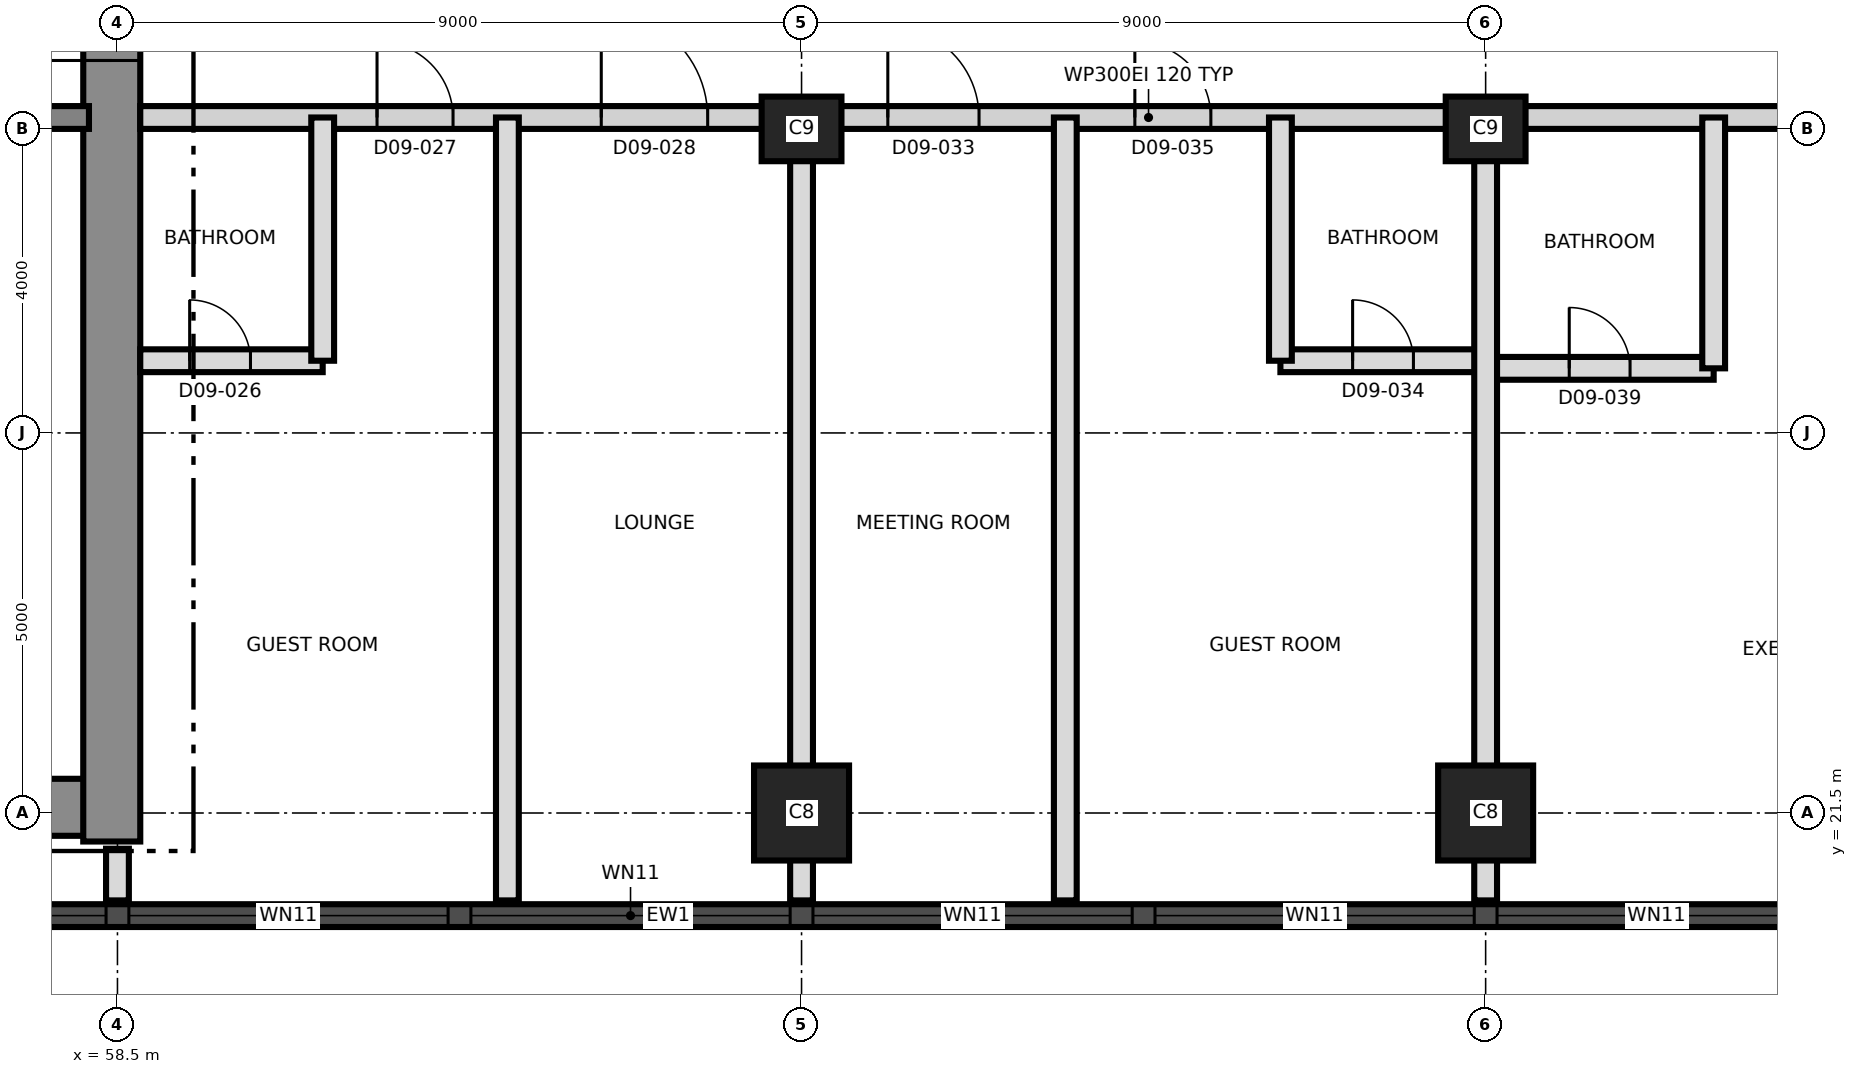
"""IFC4 building model, lengths in metres.
Left out: names, types, materials, properties, quantities, classifications, styles, units other than length and angle.
Written with IfcOpenShell. Run it as: python <this file> out.ifc"""

import sys

from ifc_helpers import new_model, si_unit, direction, frame, frame_2d, origin, origin_2d, place, context, subcontext, project, spatial, rectangle, extrude, element, fill, save


model = new_model("IFC4")
c1 = context("Model", 3, precision=1e-05, world=origin(), true_north=direction((0.0, 1.0)))
c2 = subcontext(c1, "Body", "Model", "MODEL_VIEW")
j1 = project(units=[si_unit("LENGTHUNIT", "METRE"), si_unit("PLANEANGLEUNIT", "RADIAN")], contexts=[c1])
p1 = place(None, origin())
s1 = spatial("IfcSite", under=j1, at=p1, CompositionType="ELEMENT")
p2 = place(p1, origin())
s2 = spatial("IfcBuilding", under=s1, at=p2, CompositionType="ELEMENT")
p3 = place(p2, frame((0.0, 0.0, 109.3)))
s3 = spatial("IfcBuildingStorey", under=s2, at=p3, CompositionType="ELEMENT", Elevation=109.3)
p4 = place(p3, frame((31.125, 21.575, 0.0), z_axis=(0.0, 0.0, 1.0), x_axis=(1.0, 0.0, 0.0)))
e1 = element("IfcWall", 1, at=p4, inside=s3, PredefinedType="SHEAR", context=c2, shape_type="SweptSolid", body=[
    extrude(rectangle(XDim=27.0, YDim=0.75, at=frame_2d((13.5, 0.0))), origin(), (0.0, 0.0, 1.0), 3.7),
])
p5 = place(p3, frame((58.425, 21.125, 0.0), z_axis=(0.0, 0.0, 1.0), x_axis=(0.0, 1.0, 0.0)))
e2 = element("IfcWall", 2, at=p5, inside=s3, PredefinedType="SHEAR", context=c2, shape_type="SweptSolid", body=[
    extrude(rectangle(XDim=18.75, YDim=0.75, at=frame_2d((9.375, 0.0))), origin(), (0.0, 0.0, 1.0), 3.7),
])
p6 = place(p5, frame((10.275, 0.0, 0.0)))
e3 = element("IfcOpeningElement", 3, at=p6, cuts=e2, PredefinedType="OPENING", context=c2, shape_type="SweptSolid", body=[
    extrude(rectangle(XDim=1.2, YDim=2.1, at=frame_2d((0.6, 1.05))), frame((0.0, 0.385, 0.0), z_axis=(0.0, -1.0, 0.0), x_axis=(1.0, 0.0, 0.0)), (0.0, 0.0, 1.0), 0.77),
])
p7 = place(p3, frame((31.875, 30.65, 0.0), z_axis=(0.0, 0.0, 1.0), x_axis=(1.0, 0.0, 0.0)))
e4 = element("IfcWall", 4, at=p7, inside=s3, PredefinedType="SHEAR", context=c2, shape_type="SweptSolid", body=[
    extrude(rectangle(XDim=26.25, YDim=0.3, at=frame_2d((13.125, 0.0))), origin(), (0.0, 0.0, 1.0), 3.7),
])
p8 = place(p7, frame((24.625, 0.0, 0.0)))
e5 = element("IfcOpeningElement", 5, at=p8, cuts=e4, PredefinedType="OPENING", context=c2, shape_type="SweptSolid", body=[
    extrude(rectangle(XDim=1.0, YDim=2.1, at=frame_2d((0.5, 1.05))), frame((0.0, 0.16, 0.0), z_axis=(0.0, -1.0, 0.0), x_axis=(1.0, 0.0, 0.0)), (0.0, 0.0, 1.0), 0.32),
])
p9 = place(p7, frame((11.425, 0.0, 0.0)))
e6 = element("IfcOpeningElement", 6, at=p9, cuts=e4, PredefinedType="OPENING", context=c2, shape_type="SweptSolid", body=[
    extrude(rectangle(XDim=1.0, YDim=2.1, at=frame_2d((0.5, 1.05))), frame((0.0, 0.16, 0.0), z_axis=(0.0, -1.0, 0.0), x_axis=(1.0, 0.0, 0.0)), (0.0, 0.0, 1.0), 0.32),
])
for number, where, z_axis, x_axis in (
    (7, (67.5, 21.5, 0.0), (0.0, 0.0, 1.0), (1.0, 0.0, 0.0)),
    (8, (76.5, 21.5, 0.0), (0.0, 0.0, 1.0), (1.0, 0.0, 0.0)),
):
    element("IfcColumn", number, at=place(p3, frame(where, z_axis=z_axis, x_axis=x_axis)), inside=s3, PredefinedType="COLUMN", context=c2, shape_type="SweptSolid", body=[
        extrude(rectangle(XDim=1.25, YDim=1.25, at=origin_2d()), origin(), (0.0, 0.0, 1.0), 3.7),
    ])
for number, where, z_axis, x_axis in (
    (9, (67.5, 30.5, 0.0), (0.0, 0.0, 1.0), (1.0, 0.0, 0.0)),
    (10, (76.5, 30.5, 0.0), (0.0, 0.0, 1.0), (1.0, 0.0, 0.0)),
):
    element("IfcColumn", number, at=place(p3, frame(where, z_axis=z_axis, x_axis=x_axis)), inside=s3, PredefinedType="COLUMN", context=c2, shape_type="SweptSolid", body=[
        extrude(rectangle(XDim=1.05, YDim=0.85, at=origin_2d()), origin(), (0.0, 0.0, 1.0), 3.7),
    ])
p10 = place(p3, frame((44.011, 20.15, 0.0), z_axis=(0.0, 0.0, 1.0), x_axis=(1.0, 0.0, 0.0)))
e11 = element("IfcWall", 11, at=p10, inside=s3, PredefinedType="SOLIDWALL", context=c2, shape_type="SweptSolid", body=[
    extrude(rectangle(XDim=43.476, YDim=0.3, at=frame_2d((21.738, 0.0))), origin(), (0.0, 0.0, 1.0), 3.4),
])
p11 = place(p10, frame((1.845, 0.0, 0.3)))
e12 = element("IfcOpeningElement", 12, at=p11, cuts=e11, PredefinedType="OPENING", context=c2, shape_type="SweptSolid", body=[
    extrude(rectangle(XDim=1.8, YDim=2.4, at=frame_2d((0.9, 1.2))), frame((0.0, 0.16, 0.0), z_axis=(0.0, -1.0, 0.0), x_axis=(1.0, 0.0, 0.0)), (0.0, 0.0, 1.0), 0.32),
])
p12 = place(p10, frame((5.639, 0.0, 0.9)))
e13 = element("IfcOpeningElement", 13, at=p12, cuts=e11, PredefinedType="OPENING", context=c2, shape_type="SweptSolid", body=[
    extrude(rectangle(XDim=4.2, YDim=1.5, at=frame_2d((2.1, 0.75))), frame((0.0, 0.16, 0.0), z_axis=(0.0, -1.0, 0.0), x_axis=(1.0, 0.0, 0.0)), (0.0, 0.0, 1.0), 0.32),
])
p13 = place(p10, frame((10.139, 0.0, 0.9)))
e14 = element("IfcOpeningElement", 14, at=p13, cuts=e11, PredefinedType="OPENING", context=c2, shape_type="SweptSolid", body=[
    extrude(rectangle(XDim=4.2, YDim=1.5, at=frame_2d((2.1, 0.75))), frame((0.0, 0.16, 0.0), z_axis=(0.0, -1.0, 0.0), x_axis=(1.0, 0.0, 0.0)), (0.0, 0.0, 1.0), 0.32),
])
p14 = place(p10, frame((14.639, 0.0, 0.9)))
e15 = element("IfcOpeningElement", 15, at=p14, cuts=e11, PredefinedType="OPENING", context=c2, shape_type="SweptSolid", body=[
    extrude(rectangle(XDim=4.2, YDim=1.5, at=frame_2d((2.1, 0.75))), frame((0.0, 0.16, 0.0), z_axis=(0.0, -1.0, 0.0), x_axis=(1.0, 0.0, 0.0)), (0.0, 0.0, 1.0), 0.32),
])
p15 = place(p10, frame((19.139, 0.0, 0.9)))
e16 = element("IfcOpeningElement", 16, at=p15, cuts=e11, PredefinedType="OPENING", context=c2, shape_type="SweptSolid", body=[
    extrude(rectangle(XDim=4.2, YDim=1.5, at=frame_2d((2.1, 0.75))), frame((0.0, 0.16, 0.0), z_axis=(0.0, -1.0, 0.0), x_axis=(1.0, 0.0, 0.0)), (0.0, 0.0, 1.0), 0.32),
])
p16 = place(p10, frame((23.639, 0.0, 0.9)))
e17 = element("IfcOpeningElement", 17, at=p16, cuts=e11, PredefinedType="OPENING", context=c2, shape_type="SweptSolid", body=[
    extrude(rectangle(XDim=4.2, YDim=1.5, at=frame_2d((2.1, 0.75))), frame((0.0, 0.16, 0.0), z_axis=(0.0, -1.0, 0.0), x_axis=(1.0, 0.0, 0.0)), (0.0, 0.0, 1.0), 0.32),
])
p17 = place(p10, frame((28.139, 0.0, 0.9)))
e18 = element("IfcOpeningElement", 18, at=p17, cuts=e11, PredefinedType="OPENING", context=c2, shape_type="SweptSolid", body=[
    extrude(rectangle(XDim=4.2, YDim=1.5, at=frame_2d((2.1, 0.75))), frame((0.0, 0.16, 0.0), z_axis=(0.0, -1.0, 0.0), x_axis=(1.0, 0.0, 0.0)), (0.0, 0.0, 1.0), 0.32),
])
p18 = place(p10, frame((32.639, 0.0, 0.9)))
e19 = element("IfcOpeningElement", 19, at=p18, cuts=e11, PredefinedType="OPENING", context=c2, shape_type="SweptSolid", body=[
    extrude(rectangle(XDim=4.2, YDim=1.5, at=frame_2d((2.1, 0.75))), frame((0.0, 0.16, 0.0), z_axis=(0.0, -1.0, 0.0), x_axis=(1.0, 0.0, 0.0)), (0.0, 0.0, 1.0), 0.32),
])
p19 = place(p10, frame((37.139, 0.0, 0.9)))
e20 = element("IfcOpeningElement", 20, at=p19, cuts=e11, PredefinedType="OPENING", context=c2, shape_type="SweptSolid", body=[
    extrude(rectangle(XDim=4.2, YDim=1.5, at=frame_2d((2.1, 0.75))), frame((0.0, 0.16, 0.0), z_axis=(0.0, -1.0, 0.0), x_axis=(1.0, 0.0, 0.0)), (0.0, 0.0, 1.0), 0.32),
])
p20 = place(p3, frame((76.5, 27.35, 0.0), z_axis=(0.0, 0.0, 1.0), x_axis=(1.0, 0.0, 0.0)))
e21 = element("IfcWall", 21, at=p20, inside=s3, PredefinedType="PARTITIONING", context=c2, shape_type="SweptSolid", body=[
    extrude(rectangle(XDim=3.0, YDim=0.3, at=frame_2d((1.5, 0.0))), origin(), (0.0, 0.0, 1.0), 3.4),
])
p21 = place(p20, frame((1.1, 0.0, 0.0)))
e22 = element("IfcOpeningElement", 22, at=p21, cuts=e21, PredefinedType="OPENING", context=c2, shape_type="SweptSolid", body=[
    extrude(rectangle(XDim=0.8, YDim=2.1, at=frame_2d((0.4, 1.05))), frame((0.0, 0.16, 0.0), z_axis=(0.0, -1.0, 0.0), x_axis=(1.0, 0.0, 0.0)), (0.0, 0.0, 1.0), 0.32),
])
p22 = place(p3, frame((58.8, 27.45, 0.0), z_axis=(0.0, 0.0, 1.0), x_axis=(1.0, 0.0, 0.0)))
e23 = element("IfcWall", 23, at=p22, inside=s3, PredefinedType="PARTITIONING", context=c2, shape_type="SweptSolid", body=[
    extrude(rectangle(XDim=2.4, YDim=0.3, at=frame_2d((1.2, 0.0))), origin(), (0.0, 0.0, 1.0), 3.4),
])
p23 = place(p22, frame((0.65, 0.0, 0.0)))
e24 = element("IfcOpeningElement", 24, at=p23, cuts=e23, PredefinedType="OPENING", context=c2, shape_type="SweptSolid", body=[
    extrude(rectangle(XDim=0.8, YDim=2.1, at=frame_2d((0.4, 1.05))), frame((0.0, 0.16, 0.0), z_axis=(0.0, -1.0, 0.0), x_axis=(1.0, 0.0, 0.0)), (0.0, 0.0, 1.0), 0.32),
])
p24 = place(p3, frame((73.8, 27.45, 0.0), z_axis=(0.0, 0.0, 1.0), x_axis=(1.0, 0.0, 0.0)))
e25 = element("IfcWall", 25, at=p24, inside=s3, PredefinedType="PARTITIONING", context=c2, shape_type="SweptSolid", body=[
    extrude(rectangle(XDim=2.7, YDim=0.3, at=frame_2d((1.35, 0.0))), origin(), (0.0, 0.0, 1.0), 3.4),
])
p25 = place(p24, frame((0.95, 0.0, 0.0)))
e26 = element("IfcOpeningElement", 26, at=p25, cuts=e25, PredefinedType="OPENING", context=c2, shape_type="SweptSolid", body=[
    extrude(rectangle(XDim=0.8, YDim=2.1, at=frame_2d((0.4, 1.05))), frame((0.0, 0.16, 0.0), z_axis=(0.0, -1.0, 0.0), x_axis=(1.0, 0.0, 0.0)), (0.0, 0.0, 1.0), 0.32),
])
p26 = place(p3, frame((58.8, 30.65, 0.0), z_axis=(0.0, 0.0, 1.0), x_axis=(1.0, 0.0, 0.0)))
e27 = element("IfcWall", 27, at=p26, inside=s3, PredefinedType="PARTITIONING", context=c2, shape_type="SweptSolid", body=[
    extrude(rectangle(XDim=26.53, YDim=0.3, at=frame_2d((13.265, 0.0))), origin(), (0.0, 0.0, 1.0), 3.4),
])
p27 = place(p26, frame((3.115, 0.0, 0.0)))
e28 = element("IfcOpeningElement", 28, at=p27, cuts=e27, PredefinedType="OPENING", context=c2, shape_type="SweptSolid", body=[
    extrude(rectangle(XDim=1.0, YDim=2.1, at=frame_2d((0.5, 1.05))), frame((0.0, 0.16, 0.0), z_axis=(0.0, -1.0, 0.0), x_axis=(1.0, 0.0, 0.0)), (0.0, 0.0, 1.0), 0.32),
])
p28 = place(p26, frame((6.065, 0.0, 0.0)))
e29 = element("IfcOpeningElement", 29, at=p28, cuts=e27, PredefinedType="OPENING", context=c2, shape_type="SweptSolid", body=[
    extrude(rectangle(XDim=1.4, YDim=2.1, at=frame_2d((0.7, 1.05))), frame((0.0, 0.16, 0.0), z_axis=(0.0, -1.0, 0.0), x_axis=(1.0, 0.0, 0.0)), (0.0, 0.0, 1.0), 0.32),
])
p29 = place(p26, frame((9.835, 0.0, 0.0)))
e30 = element("IfcOpeningElement", 30, at=p29, cuts=e27, PredefinedType="OPENING", context=c2, shape_type="SweptSolid", body=[
    extrude(rectangle(XDim=1.2, YDim=2.1, at=frame_2d((0.6, 1.05))), frame((0.0, 0.16, 0.0), z_axis=(0.0, -1.0, 0.0), x_axis=(1.0, 0.0, 0.0)), (0.0, 0.0, 1.0), 0.32),
])
p30 = place(p26, frame((13.085, 0.0, 0.0)))
e31 = element("IfcOpeningElement", 31, at=p30, cuts=e27, PredefinedType="OPENING", context=c2, shape_type="SweptSolid", body=[
    extrude(rectangle(XDim=1.0, YDim=2.1, at=frame_2d((0.5, 1.05))), frame((0.0, 0.16, 0.0), z_axis=(0.0, -1.0, 0.0), x_axis=(1.0, 0.0, 0.0)), (0.0, 0.0, 1.0), 0.32),
])
p31 = place(p26, frame((21.7, 0.0, 0.0)))
e32 = element("IfcOpeningElement", 32, at=p31, cuts=e27, PredefinedType="OPENING", context=c2, shape_type="SweptSolid", body=[
    extrude(rectangle(XDim=1.0, YDim=2.4, at=frame_2d((0.5, 1.2))), frame((0.0, 0.16, 0.0), z_axis=(0.0, -1.0, 0.0), x_axis=(1.0, 0.0, 0.0)), (0.0, 0.0, 1.0), 0.32),
])
p32 = place(p3, frame((58.5, 20.35, 0.0), z_axis=(0.0, 0.0, 1.0), x_axis=(0.0, 1.0, 0.0)))
e33 = element("IfcWall", 33, at=p32, inside=s3, PredefinedType="PARTITIONING", context=c2, shape_type="SweptSolid", body=[
    extrude(rectangle(XDim=0.68, YDim=0.3, at=frame_2d((0.34, 0.0))), origin(), (0.0, 0.0, 1.0), 3.4),
])
p33 = place(p3, frame((61.2, 27.45, 0.0), z_axis=(0.0, 0.0, 1.0), x_axis=(0.0, 1.0, 0.0)))
e34 = element("IfcWall", 34, at=p33, inside=s3, PredefinedType="PARTITIONING", context=c2, shape_type="SweptSolid", body=[
    extrude(rectangle(XDim=3.2, YDim=0.3, at=frame_2d((1.6, 0.0))), origin(), (0.0, 0.0, 1.0), 3.4),
])
for number, where, z_axis, x_axis in (
    (35, (63.63, 20.35, 0.0), (0.0, 0.0, 1.0), (0.0, 1.0, 0.0)),
    (36, (67.5, 20.35, 0.0), (0.0, 0.0, 1.0), (0.0, 1.0, 0.0)),
    (37, (70.97, 20.35, 0.0), (0.0, 0.0, 1.0), (0.0, 1.0, 0.0)),
):
    element("IfcWall", number, at=place(p3, frame(where, z_axis=z_axis, x_axis=x_axis)), inside=s3, PredefinedType="PARTITIONING", context=c2, shape_type="SweptSolid", body=[
        extrude(rectangle(XDim=10.3, YDim=0.3, at=frame_2d((5.15, 0.0))), origin(), (0.0, 0.0, 1.0), 3.4),
    ])
p34 = place(p3, frame((73.8, 27.45, 0.0), z_axis=(0.0, 0.0, 1.0), x_axis=(0.0, 1.0, 0.0)))
e38 = element("IfcWall", 38, at=p34, inside=s3, PredefinedType="PARTITIONING", context=c2, shape_type="SweptSolid", body=[
    extrude(rectangle(XDim=3.2, YDim=0.3, at=frame_2d((1.6, 0.0))), origin(), (0.0, 0.0, 1.0), 3.4),
])
p35 = place(p3, frame((76.5, 20.35, 0.0), z_axis=(0.0, 0.0, 1.0), x_axis=(0.0, 1.0, 0.0)))
e39 = element("IfcWall", 39, at=p35, inside=s3, PredefinedType="PARTITIONING", context=c2, shape_type="SweptSolid", body=[
    extrude(rectangle(XDim=10.3, YDim=0.3, at=frame_2d((5.15, 0.0))), origin(), (0.0, 0.0, 1.0), 3.4),
])
p36 = place(p3, frame((79.5, 27.35, 0.0), z_axis=(0.0, 0.0, 1.0), x_axis=(0.0, 1.0, 0.0)))
e40 = element("IfcWall", 40, at=p36, inside=s3, PredefinedType="PARTITIONING", context=c2, shape_type="SweptSolid", body=[
    extrude(rectangle(XDim=3.3, YDim=0.3, at=frame_2d((1.65, 0.0))), origin(), (0.0, 0.0, 1.0), 3.4),
])
p37 = place(p13, origin())
e41 = element("IfcWindow", 41, at=p37, inside=s3, PartitioningType="SINGLE_PANEL", PredefinedType="WINDOW", context=c2, shape_type="SweptSolid", body=[
    extrude(rectangle(XDim=4.2, YDim=1.5, at=frame_2d((2.1, 0.75))), frame((0.0, 0.03, 0.0), z_axis=(0.0, -1.0, 0.0), x_axis=(1.0, 0.0, 0.0)), (0.0, 0.0, 1.0), 0.06),
])
fill(e14, e41)
p38 = place(p14, origin())
e42 = element("IfcWindow", 42, at=p38, inside=s3, PartitioningType="SINGLE_PANEL", PredefinedType="WINDOW", context=c2, shape_type="SweptSolid", body=[
    extrude(rectangle(XDim=4.2, YDim=1.5, at=frame_2d((2.1, 0.75))), frame((0.0, 0.03, 0.0), z_axis=(0.0, -1.0, 0.0), x_axis=(1.0, 0.0, 0.0)), (0.0, 0.0, 1.0), 0.06),
])
fill(e15, e42)
p39 = place(p15, origin())
e43 = element("IfcWindow", 43, at=p39, inside=s3, PartitioningType="SINGLE_PANEL", PredefinedType="WINDOW", context=c2, shape_type="SweptSolid", body=[
    extrude(rectangle(XDim=4.2, YDim=1.5, at=frame_2d((2.1, 0.75))), frame((0.0, 0.03, 0.0), z_axis=(0.0, -1.0, 0.0), x_axis=(1.0, 0.0, 0.0)), (0.0, 0.0, 1.0), 0.06),
])
fill(e16, e43)
p40 = place(p16, origin())
e44 = element("IfcWindow", 44, at=p40, inside=s3, PartitioningType="SINGLE_PANEL", PredefinedType="WINDOW", context=c2, shape_type="SweptSolid", body=[
    extrude(rectangle(XDim=4.2, YDim=1.5, at=frame_2d((2.1, 0.75))), frame((0.0, 0.03, 0.0), z_axis=(0.0, -1.0, 0.0), x_axis=(1.0, 0.0, 0.0)), (0.0, 0.0, 1.0), 0.06),
])
fill(e17, e44)
p41 = place(p17, origin())
e45 = element("IfcWindow", 45, at=p41, inside=s3, PartitioningType="SINGLE_PANEL", PredefinedType="WINDOW", context=c2, shape_type="SweptSolid", body=[
    extrude(rectangle(XDim=4.2, YDim=1.5, at=frame_2d((2.1, 0.75))), frame((0.0, 0.03, 0.0), z_axis=(0.0, -1.0, 0.0), x_axis=(1.0, 0.0, 0.0)), (0.0, 0.0, 1.0), 0.06),
])
fill(e18, e45)
p42 = place(p18, origin())
e46 = element("IfcWindow", 46, at=p42, inside=s3, PartitioningType="SINGLE_PANEL", PredefinedType="WINDOW", context=c2, shape_type="SweptSolid", body=[
    extrude(rectangle(XDim=4.2, YDim=1.5, at=frame_2d((2.1, 0.75))), frame((0.0, 0.03, 0.0), z_axis=(0.0, -1.0, 0.0), x_axis=(1.0, 0.0, 0.0)), (0.0, 0.0, 1.0), 0.06),
])
fill(e19, e46)
p43 = place(p6, origin())
e47 = element("IfcDoor", 47, at=p43, inside=s3, OperationType="SINGLE_SWING_LEFT", PredefinedType="DOOR", context=c2, shape_type="SweptSolid", body=[
    extrude(rectangle(XDim=1.2, YDim=2.1, at=frame_2d((0.6, 1.05))), frame((0.0, 0.025, 0.0), z_axis=(0.0, -1.0, 0.0), x_axis=(1.0, 0.0, 0.0)), (0.0, 0.0, 1.0), 0.05),
])
fill(e3, e47)
p44 = place(p23, origin())
e48 = element("IfcDoor", 48, at=p44, inside=s3, OperationType="SINGLE_SWING_LEFT", PredefinedType="DOOR", context=c2, shape_type="SweptSolid", body=[
    extrude(rectangle(XDim=0.8, YDim=2.1, at=frame_2d((0.4, 1.05))), frame((0.0, 0.025, 0.0), z_axis=(0.0, -1.0, 0.0), x_axis=(1.0, 0.0, 0.0)), (0.0, 0.0, 1.0), 0.05),
])
fill(e24, e48)
p45 = place(p27, origin())
e49 = element("IfcDoor", 49, at=p45, inside=s3, OperationType="SINGLE_SWING_RIGHT", PredefinedType="DOOR", context=c2, shape_type="SweptSolid", body=[
    extrude(rectangle(XDim=1.0, YDim=2.1, at=frame_2d((0.5, 1.05))), frame((0.0, 0.025, 0.0), z_axis=(0.0, -1.0, 0.0), x_axis=(1.0, 0.0, 0.0)), (0.0, 0.0, 1.0), 0.05),
])
fill(e28, e49)
p46 = place(p28, origin())
e50 = element("IfcDoor", 50, at=p46, inside=s3, OperationType="SINGLE_SWING_LEFT", PredefinedType="DOOR", context=c2, shape_type="SweptSolid", body=[
    extrude(rectangle(XDim=1.4, YDim=2.1, at=frame_2d((0.7, 1.05))), frame((0.0, 0.025, 0.0), z_axis=(0.0, -1.0, 0.0), x_axis=(1.0, 0.0, 0.0)), (0.0, 0.0, 1.0), 0.05),
])
fill(e29, e50)
p47 = place(p29, origin())
e51 = element("IfcDoor", 51, at=p47, inside=s3, OperationType="SINGLE_SWING_LEFT", PredefinedType="DOOR", context=c2, shape_type="SweptSolid", body=[
    extrude(rectangle(XDim=1.2, YDim=2.1, at=frame_2d((0.6, 1.05))), frame((0.0, 0.025, 0.0), z_axis=(0.0, -1.0, 0.0), x_axis=(1.0, 0.0, 0.0)), (0.0, 0.0, 1.0), 0.05),
])
fill(e30, e51)
p48 = place(p25, origin())
e52 = element("IfcDoor", 52, at=p48, inside=s3, OperationType="SINGLE_SWING_RIGHT", PredefinedType="DOOR", context=c2, shape_type="SweptSolid", body=[
    extrude(rectangle(XDim=0.8, YDim=2.1, at=frame_2d((0.4, 1.05))), frame((0.0, 0.025, 0.0), z_axis=(0.0, -1.0, 0.0), x_axis=(1.0, 0.0, 0.0)), (0.0, 0.0, 1.0), 0.05),
])
fill(e26, e52)
p49 = place(p30, origin())
e53 = element("IfcDoor", 53, at=p49, inside=s3, OperationType="SINGLE_SWING_LEFT", PredefinedType="DOOR", context=c2, shape_type="SweptSolid", body=[
    extrude(rectangle(XDim=1.0, YDim=2.1, at=frame_2d((0.5, 1.05))), frame((0.0, 0.025, 0.0), z_axis=(0.0, -1.0, 0.0), x_axis=(1.0, 0.0, 0.0)), (0.0, 0.0, 1.0), 0.05),
])
fill(e31, e53)
p50 = place(p21, origin())
e54 = element("IfcDoor", 54, at=p50, inside=s3, OperationType="SINGLE_SWING_LEFT", PredefinedType="DOOR", context=c2, shape_type="SweptSolid", body=[
    extrude(rectangle(XDim=0.8, YDim=2.1, at=frame_2d((0.4, 1.05))), frame((0.0, 0.025, 0.0), z_axis=(0.0, -1.0, 0.0), x_axis=(1.0, 0.0, 0.0)), (0.0, 0.0, 1.0), 0.05),
])
fill(e22, e54)
save(model, sys.argv[1])
